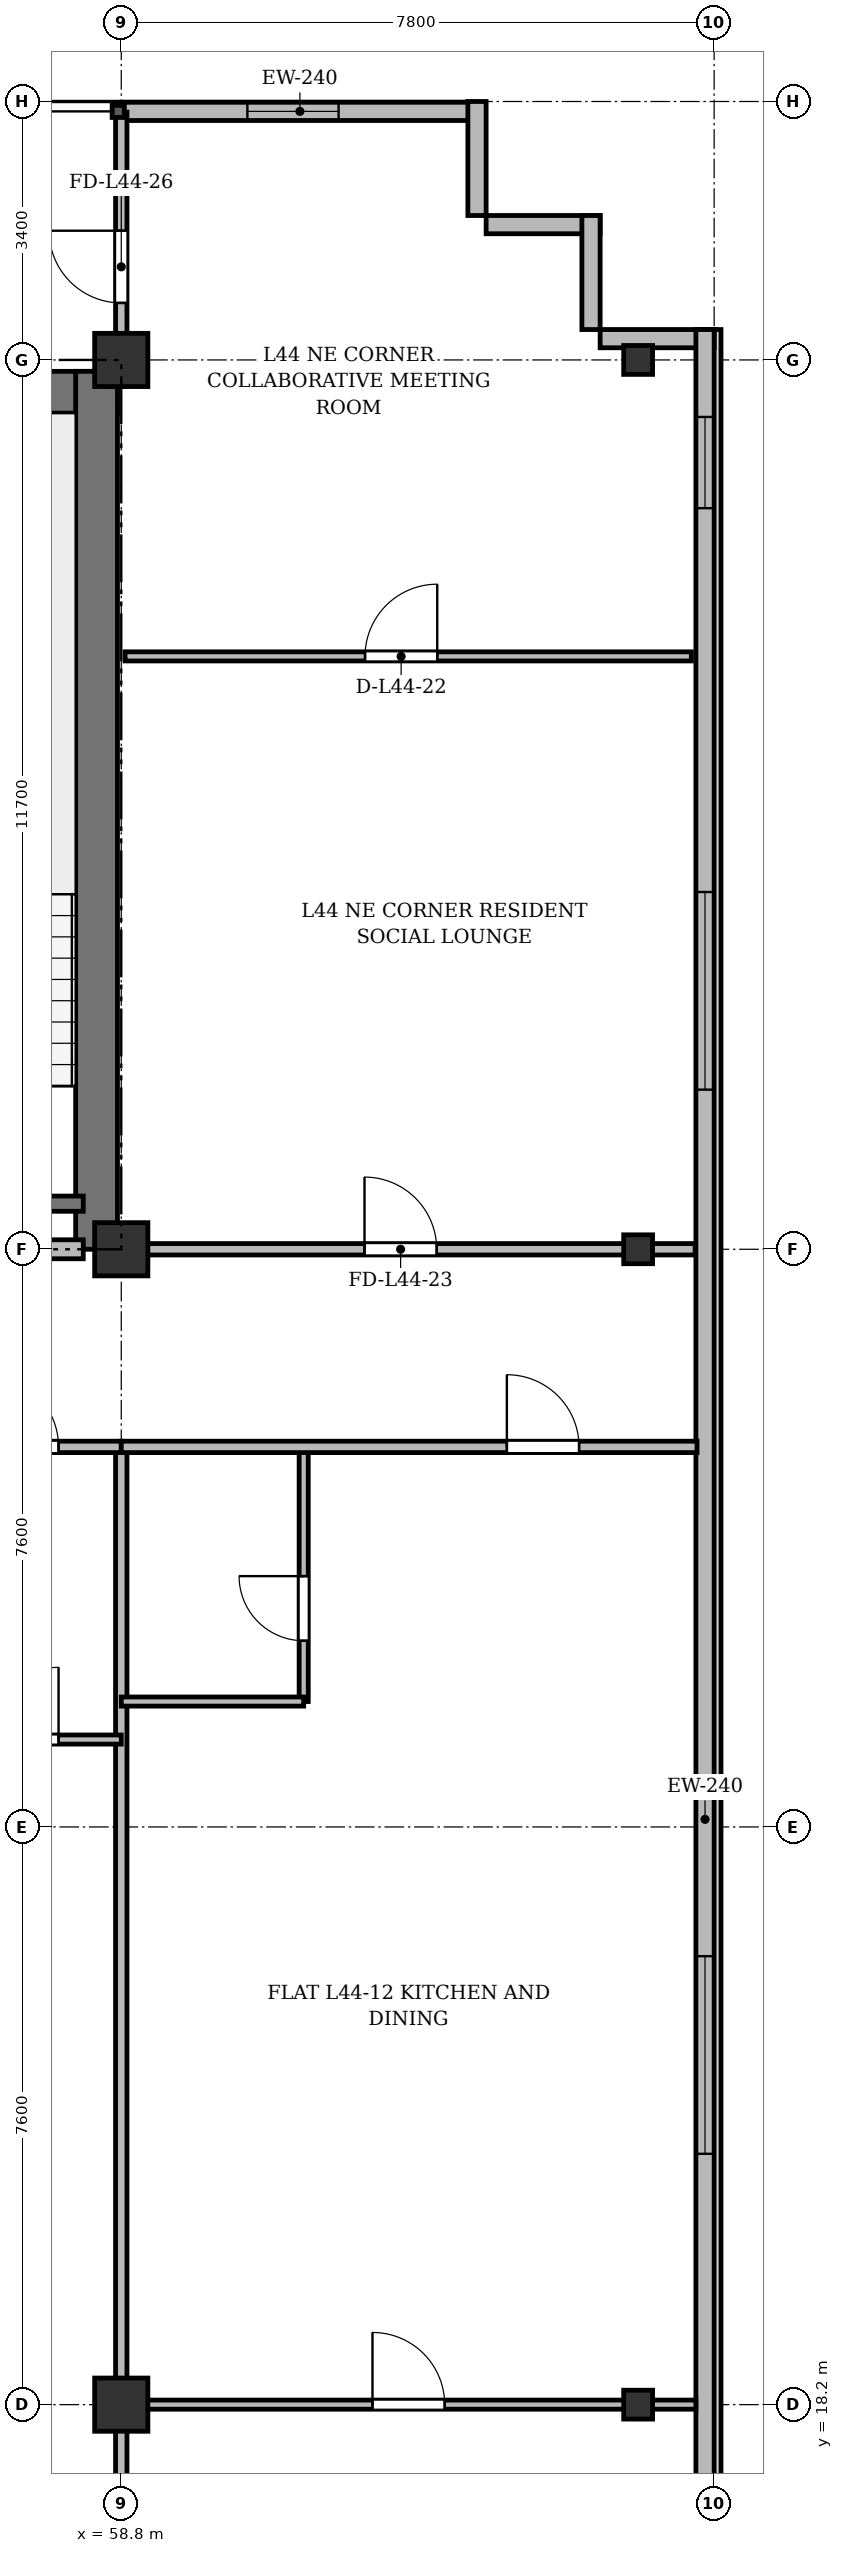
"""IFC4 building model, lengths in metres.
Left out: names, types, materials, properties, quantities, classifications, styles, units other than length and angle.
Written with IfcOpenShell. Run it as: python <this file> out.ifc"""

import sys

from ifc_helpers import new_model, si_unit, direction, frame, frame_2d, origin, origin_2d, place, context, subcontext, project, spatial, rectangle, i_section, extrude, source, transform, mapped, element, fill, save


model = new_model("IFC4")
c1 = context("Model", 3, precision=1e-05, world=origin(), true_north=direction((0.0, 1.0)))
c2 = subcontext(c1, "Body", "Model", "MODEL_VIEW")
j1 = project(units=[si_unit("LENGTHUNIT", "METRE"), si_unit("PLANEANGLEUNIT", "RADIAN")], contexts=[c1])
p1 = place(None, origin())
s1 = spatial("IfcSite", under=j1, at=p1, CompositionType="ELEMENT")
p2 = place(p1, origin())
s2 = spatial("IfcBuilding", under=s1, at=p2, CompositionType="ELEMENT")
p3 = place(p2, frame((0.0, 0.0, 168.1)))
s3 = spatial("IfcBuildingStorey", under=s2, at=p3, CompositionType="ELEMENT", Elevation=168.1)
m1 = source(origin(), c2, "Body", "SweptSolid", [
    extrude(rectangle(XDim=0.7, YDim=0.7, at=origin_2d()), origin(), (0.0, 0.0, 1.0), 3.6),
])
for number, where, z_axis, x_axis in (
    (1, (58.8, 18.2, 0.0), (0.0, 0.0, 1.0), (1.0, 0.0, 0.0)),
    (2, (58.8, 33.4, 0.0), (0.0, 0.0, 1.0), (1.0, 0.0, 0.0)),
    (3, (58.8, 45.1, 0.0), (0.0, 0.0, 1.0), (1.0, 0.0, 0.0)),
):
    element("IfcColumn", number, at=place(p3, frame(where, z_axis=z_axis, x_axis=x_axis)), inside=s3, PredefinedType="COLUMN", context=c2, shape_type="MappedRepresentation", body=[
        mapped(m1, transform((0.0, 0.0, 0.0), x_axis=(1.0, 0.0, 0.0), y_axis=(0.0, 1.0, 0.0), z_axis=(0.0, 0.0, 1.0), scale=1.0)),
    ])
m2 = source(origin(), c2, "Body", "SweptSolid", [
    extrude(i_section(OverallWidth=0.38, OverallDepth=0.38, WebThickness=0.02, FlangeThickness=0.03, at=origin_2d()), origin(), (0.0, 0.0, 1.0), 3.6),
])
for number, where, z_axis, x_axis in (
    (4, (65.6, 18.2, 0.0), (0.0, 0.0, 1.0), (1.0, 0.0, 0.0)),
    (5, (65.6, 33.4, 0.0), (0.0, 0.0, 1.0), (1.0, 0.0, 0.0)),
    (6, (65.6, 45.1, 0.0), (0.0, 0.0, 1.0), (1.0, 0.0, 0.0)),
):
    element("IfcColumn", number, at=place(p3, frame(where, z_axis=z_axis, x_axis=x_axis)), inside=s3, PredefinedType="COLUMN", context=c2, shape_type="MappedRepresentation", body=[
        mapped(m2, transform((0.0, 0.0, 0.0), x_axis=(1.0, 0.0, 0.0), y_axis=(0.0, 1.0, 0.0), z_axis=(0.0, 0.0, 1.0), scale=1.0)),
    ])
p4 = place(p3, frame((58.8, 48.37, 0.0), z_axis=(0.0, 0.0, 1.0), x_axis=(1.0, 0.0, 0.0)))
e7 = element("IfcWall", 7, at=p4, inside=s3, PredefinedType="SOLIDWALL", context=c2, shape_type="SweptSolid", body=[
    extrude(rectangle(XDim=4.7, YDim=0.24, at=frame_2d((2.35, 0.0))), origin(), (0.0, 0.0, 1.0), 3.35),
])
p5 = place(p4, frame((1.659, 0.0, 0.9)))
e8 = element("IfcOpeningElement", 8, at=p5, cuts=e7, PredefinedType="OPENING", context=c2, shape_type="SweptSolid", body=[
    extrude(rectangle(XDim=1.2, YDim=1.65, at=frame_2d((0.6, 0.825))), frame((0.0, 0.13, 0.0), z_axis=(0.0, -1.0, 0.0), x_axis=(1.0, 0.0, 0.0)), (0.0, 0.0, 1.0), 0.26),
])
for number, where, z_axis, x_axis in (
    (9, (63.48, 48.5, 0.0), (0.0, 0.0, 1.0), (0.0, -1.0, 0.0)),
    (10, (63.6, 46.88, 0.0), (0.0, 0.0, 1.0), (1.0, 0.0, 0.0)),
    (11, (64.98, 47.0, 0.0), (0.0, 0.0, 1.0), (0.0, -1.0, 0.0)),
    (12, (65.1, 45.38, 0.0), (0.0, 0.0, 1.0), (1.0, 0.0, 0.0)),
):
    element("IfcWall", number, at=place(p3, frame(where, z_axis=z_axis, x_axis=x_axis)), inside=s3, PredefinedType="SOLIDWALL", context=c2, shape_type="SweptSolid", body=[
        extrude(rectangle(XDim=1.5, YDim=0.24, at=frame_2d((0.75, 0.0))), origin(), (0.0, 0.0, 1.0), 3.35),
    ])
p6 = place(p3, frame((66.48, 45.5, 0.0), z_axis=(0.0, 0.0, 1.0), x_axis=(0.0, -1.0, 0.0)))
e13 = element("IfcWall", 13, at=p6, inside=s3, PredefinedType="SOLIDWALL", context=c2, shape_type="SweptSolid", body=[
    extrude(rectangle(XDim=39.2, YDim=0.24, at=frame_2d((19.6, 0.0))), origin(), (0.0, 0.0, 1.0), 3.35),
])
p7 = place(p6, frame((36.55, 0.0, 0.92)))
e14 = element("IfcOpeningElement", 14, at=p7, cuts=e13, PredefinedType="OPENING", context=c2, shape_type="SweptSolid", body=[
    extrude(rectangle(XDim=1.2, YDim=1.65, at=frame_2d((0.6, 0.825))), frame((0.0, 0.13, 0.0), z_axis=(0.0, -1.0, 0.0), x_axis=(1.0, 0.0, 0.0)), (0.0, 0.0, 1.0), 0.26),
])
p8 = place(p6, frame((32.8, 0.0, 0.92)))
e15 = element("IfcOpeningElement", 15, at=p8, cuts=e13, PredefinedType="OPENING", context=c2, shape_type="SweptSolid", body=[
    extrude(rectangle(XDim=2.6, YDim=1.9, at=frame_2d((1.3, 0.95))), frame((0.0, 0.13, 0.0), z_axis=(0.0, -1.0, 0.0), x_axis=(1.0, 0.0, 0.0)), (0.0, 0.0, 1.0), 0.26),
])
p9 = place(p6, frame((28.6, 0.0, 0.92)))
e16 = element("IfcOpeningElement", 16, at=p9, cuts=e13, PredefinedType="OPENING", context=c2, shape_type="SweptSolid", body=[
    extrude(rectangle(XDim=2.6, YDim=1.9, at=frame_2d((1.3, 0.95))), frame((0.0, 0.13, 0.0), z_axis=(0.0, -1.0, 0.0), x_axis=(1.0, 0.0, 0.0)), (0.0, 0.0, 1.0), 0.26),
])
p10 = place(p6, frame((21.4, 0.0, 0.92)))
e17 = element("IfcOpeningElement", 17, at=p10, cuts=e13, PredefinedType="OPENING", context=c2, shape_type="SweptSolid", body=[
    extrude(rectangle(XDim=2.6, YDim=1.9, at=frame_2d((1.3, 0.95))), frame((0.0, 0.13, 0.0), z_axis=(0.0, -1.0, 0.0), x_axis=(1.0, 0.0, 0.0)), (0.0, 0.0, 1.0), 0.26),
])
p11 = place(p6, frame((7.4, 0.0, 0.92)))
e18 = element("IfcOpeningElement", 18, at=p11, cuts=e13, PredefinedType="OPENING", context=c2, shape_type="SweptSolid", body=[
    extrude(rectangle(XDim=2.6, YDim=1.9, at=frame_2d((1.3, 0.95))), frame((0.0, 0.13, 0.0), z_axis=(0.0, -1.0, 0.0), x_axis=(1.0, 0.0, 0.0)), (0.0, 0.0, 1.0), 0.26),
])
p12 = place(p6, frame((1.15, 0.0, 0.92)))
e19 = element("IfcOpeningElement", 19, at=p12, cuts=e13, PredefinedType="OPENING", context=c2, shape_type="SweptSolid", body=[
    extrude(rectangle(XDim=1.2, YDim=1.65, at=frame_2d((0.6, 0.825))), frame((0.0, 0.13, 0.0), z_axis=(0.0, -1.0, 0.0), x_axis=(1.0, 0.0, 0.0)), (0.0, 0.0, 1.0), 0.26),
])
p13 = place(p3, frame((15.65, 44.675, 0.0), z_axis=(0.0, 0.0, 1.0), x_axis=(1.0, 0.0, 0.0)))
e20 = element("IfcWall", 20, at=p13, inside=s3, PredefinedType="SHEAR", context=c2, shape_type="SweptSolid", body=[
    extrude(rectangle(XDim=43.1, YDim=0.55, at=frame_2d((21.55, 0.0))), origin(), (0.0, 0.0, 1.0), 3.35),
])
p14 = place(p3, frame((58.475, 33.4, 0.0), z_axis=(0.0, 0.0, 1.0), x_axis=(0.0, 1.0, 0.0)))
e21 = element("IfcWall", 21, at=p14, inside=s3, PredefinedType="SHEAR", context=c2, shape_type="SweptSolid", body=[
    extrude(rectangle(XDim=11.55, YDim=0.55, at=frame_2d((5.775, 0.0))), origin(), (0.0, 0.0, 1.0), 3.35),
])
p15 = place(p3, frame((54.9, 34.0, 0.0), z_axis=(0.0, 0.0, 1.0), x_axis=(1.0, 0.0, 0.0)))
e22 = element("IfcWall", 22, at=p15, inside=s3, PredefinedType="SHEAR", context=c2, shape_type="SweptSolid", body=[
    extrude(rectangle(XDim=3.4, YDim=0.2, at=frame_2d((1.7, 0.0))), origin(), (0.0, 0.0, 1.0), 3.35),
])
p16 = place(p3, frame((47.15, 33.4, 0.0), z_axis=(0.0, 0.0, 1.0), x_axis=(1.0, 0.0, 0.0)))
e23 = element("IfcWall", 23, at=p16, inside=s3, PredefinedType="PARTITIONING", context=c2, shape_type="SweptSolid", body=[
    extrude(rectangle(XDim=11.15, YDim=0.25, at=frame_2d((5.575, 0.0))), origin(), (0.0, 0.0, 1.0), 2.75),
])
p17 = place(p16, frame((0.7, 0.0, 0.0)))
e24 = element("IfcOpeningElement", 24, at=p17, cuts=e23, PredefinedType="OPENING", context=c2, shape_type="SweptSolid", body=[
    extrude(rectangle(XDim=0.95, YDim=2.15, at=frame_2d((0.475, 1.075))), frame((0.0, 0.135, 0.0), z_axis=(0.0, -1.0, 0.0), x_axis=(1.0, 0.0, 0.0)), (0.0, 0.0, 1.0), 0.27),
])
p18 = place(p16, frame((6.0, 0.0, 0.0)))
e25 = element("IfcOpeningElement", 25, at=p18, cuts=e23, PredefinedType="OPENING", context=c2, shape_type="SweptSolid", body=[
    extrude(rectangle(XDim=1.2, YDim=2.15, at=frame_2d((0.6, 1.075))), frame((0.0, 0.135, 0.0), z_axis=(0.0, -1.0, 0.0), x_axis=(1.0, 0.0, 0.0)), (0.0, 0.0, 1.0), 0.27),
])
p19 = place(p3, frame((58.85, 41.2, 0.0), z_axis=(0.0, 0.0, 1.0), x_axis=(1.0, 0.0, 0.0)))
e26 = element("IfcWall", 26, at=p19, inside=s3, PredefinedType="PARTITIONING", context=c2, shape_type="SweptSolid", body=[
    extrude(rectangle(XDim=7.45, YDim=0.12, at=frame_2d((3.725, 0.0))), origin(), (0.0, 0.0, 1.0), 2.85),
])
p20 = place(p19, frame((3.157, 0.0, 0.0)))
e27 = element("IfcOpeningElement", 27, at=p20, cuts=e26, PredefinedType="OPENING", context=c2, shape_type="SweptSolid", body=[
    extrude(rectangle(XDim=0.95, YDim=2.15, at=frame_2d((0.475, 1.075))), frame((0.0, 0.07, 0.0), z_axis=(0.0, -1.0, 0.0), x_axis=(1.0, 0.0, 0.0)), (0.0, 0.0, 1.0), 0.14),
])
p21 = place(p3, frame((58.8, 33.4, 0.0), z_axis=(0.0, 0.0, 1.0), x_axis=(1.0, 0.0, 0.0)))
e28 = element("IfcWall", 28, at=p21, inside=s3, PredefinedType="PARTITIONING", context=c2, shape_type="SweptSolid", body=[
    extrude(rectangle(XDim=7.55, YDim=0.15, at=frame_2d((3.775, 0.0))), origin(), (0.0, 0.0, 1.0), 2.75),
])
p22 = place(p21, frame((3.2, 0.0, 0.0)))
e29 = element("IfcOpeningElement", 29, at=p22, cuts=e28, PredefinedType="OPENING", context=c2, shape_type="SweptSolid", body=[
    extrude(rectangle(XDim=0.95, YDim=2.15, at=frame_2d((0.475, 1.075))), frame((0.0, 0.085, 0.0), z_axis=(0.0, -1.0, 0.0), x_axis=(1.0, 0.0, 0.0)), (0.0, 0.0, 1.0), 0.17),
])
p23 = place(p3, frame((58.8, 44.75, 0.0), z_axis=(0.0, 0.0, 1.0), x_axis=(0.0, 1.0, 0.0)))
e30 = element("IfcWall", 30, at=p23, inside=s3, PredefinedType="PARTITIONING", context=c2, shape_type="SweptSolid", body=[
    extrude(rectangle(XDim=3.61, YDim=0.15, at=frame_2d((1.805, 0.0))), origin(), (0.0, 0.0, 1.0), 2.85),
])
p24 = place(p23, frame((1.1, 0.0, 0.0)))
e31 = element("IfcOpeningElement", 31, at=p24, cuts=e30, PredefinedType="OPENING", context=c2, shape_type="SweptSolid", body=[
    extrude(rectangle(XDim=0.95, YDim=2.15, at=frame_2d((0.475, 1.075))), frame((0.0, 0.085, 0.0), z_axis=(0.0, -1.0, 0.0), x_axis=(1.0, 0.0, 0.0)), (0.0, 0.0, 1.0), 0.17),
])
p25 = place(p3, frame((58.8, 3.525, 0.0), z_axis=(0.0, 0.0, 1.0), x_axis=(0.0, 1.0, 0.0)))
e32 = element("IfcWall", 32, at=p25, inside=s3, PredefinedType="PARTITIONING", context=c2, shape_type="SweptSolid", body=[
    extrude(rectangle(XDim=27.275, YDim=0.15, at=frame_2d((13.638, 0.0))), origin(), (0.0, 0.0, 1.0), 2.85),
])
p26 = place(p3, frame((56.2, 30.8, 0.0), z_axis=(0.0, 0.0, 1.0), x_axis=(1.0, 0.0, 0.0)))
e33 = element("IfcWall", 33, at=p26, inside=s3, PredefinedType="PARTITIONING", context=c2, shape_type="SweptSolid", body=[
    extrude(rectangle(XDim=2.6, YDim=0.15, at=frame_2d((1.3, 0.0))), origin(), (0.0, 0.0, 1.0), 2.85),
])
p27 = place(p26, frame((0.825, 0.0, 0.0)))
e34 = element("IfcOpeningElement", 34, at=p27, cuts=e33, PredefinedType="OPENING", context=c2, shape_type="SweptSolid", body=[
    extrude(rectangle(XDim=0.95, YDim=2.15, at=frame_2d((0.475, 1.075))), frame((0.0, 0.085, 0.0), z_axis=(0.0, -1.0, 0.0), x_axis=(1.0, 0.0, 0.0)), (0.0, 0.0, 1.0), 0.17),
])
p28 = place(p3, frame((56.2, 26.95, 0.0), z_axis=(0.0, 0.0, 1.0), x_axis=(1.0, 0.0, 0.0)))
e35 = element("IfcWall", 35, at=p28, inside=s3, PredefinedType="PARTITIONING", context=c2, shape_type="SweptSolid", body=[
    extrude(rectangle(XDim=2.6, YDim=0.12, at=frame_2d((1.3, 0.0))), origin(), (0.0, 0.0, 1.0), 2.85),
])
p29 = place(p28, frame((0.825, 0.0, 0.0)))
e36 = element("IfcOpeningElement", 36, at=p29, cuts=e35, PredefinedType="OPENING", context=c2, shape_type="SweptSolid", body=[
    extrude(rectangle(XDim=0.95, YDim=2.15, at=frame_2d((0.475, 1.075))), frame((0.0, 0.07, 0.0), z_axis=(0.0, -1.0, 0.0), x_axis=(1.0, 0.0, 0.0)), (0.0, 0.0, 1.0), 0.14),
])
p30 = place(p3, frame((58.8, 18.2, 0.0), z_axis=(0.0, 0.0, 1.0), x_axis=(1.0, 0.0, 0.0)))
e37 = element("IfcWall", 37, at=p30, inside=s3, PredefinedType="PARTITIONING", context=c2, shape_type="SweptSolid", body=[
    extrude(rectangle(XDim=7.56, YDim=0.12, at=frame_2d((3.78, 0.0))), origin(), (0.0, 0.0, 1.0), 2.75),
])
p31 = place(p30, frame((3.305, 0.0, 0.0)))
e38 = element("IfcOpeningElement", 38, at=p31, cuts=e37, PredefinedType="OPENING", context=c2, shape_type="SweptSolid", body=[
    extrude(rectangle(XDim=0.95, YDim=2.15, at=frame_2d((0.475, 1.075))), frame((0.0, 0.07, 0.0), z_axis=(0.0, -1.0, 0.0), x_axis=(1.0, 0.0, 0.0)), (0.0, 0.0, 1.0), 0.14),
])
p32 = place(p3, frame((61.2, 27.45, 0.0), z_axis=(0.0, 0.0, 1.0), x_axis=(0.0, 1.0, 0.0)))
e39 = element("IfcWall", 39, at=p32, inside=s3, PredefinedType="PARTITIONING", context=c2, shape_type="SweptSolid", body=[
    extrude(rectangle(XDim=3.35, YDim=0.12, at=frame_2d((1.675, 0.0))), origin(), (0.0, 0.0, 1.0), 3.35),
])
p33 = place(p32, frame((0.8, 0.0, 0.0)))
e40 = element("IfcOpeningElement", 40, at=p33, cuts=e39, PredefinedType="OPENING", context=c2, shape_type="SweptSolid", body=[
    extrude(rectangle(XDim=0.85, YDim=2.1, at=frame_2d((0.425, 1.05))), frame((0.0, 0.07, 0.0), z_axis=(0.0, -1.0, 0.0), x_axis=(1.0, 0.0, 0.0)), (0.0, 0.0, 1.0), 0.14),
])
p34 = place(p3, frame((58.8, 27.45, 0.0), z_axis=(0.0, 0.0, 1.0), x_axis=(1.0, 0.0, 0.0)))
e41 = element("IfcWall", 41, at=p34, inside=s3, PredefinedType="PARTITIONING", context=c2, shape_type="SweptSolid", body=[
    extrude(rectangle(XDim=2.4, YDim=0.12, at=frame_2d((1.2, 0.0))), origin(), (0.0, 0.0, 1.0), 2.85),
])
p35 = place(p3, frame((58.8, 30.8, 0.0), z_axis=(0.0, 0.0, 1.0), x_axis=(1.0, 0.0, 0.0)))
e42 = element("IfcWall", 42, at=p35, inside=s3, PredefinedType="PARTITIONING", context=c2, shape_type="SweptSolid", body=[
    extrude(rectangle(XDim=7.575, YDim=0.15, at=frame_2d((3.788, 0.0))), origin(), (0.0, 0.0, 1.0), 2.85),
])
p36 = place(p35, frame((5.073, 0.0, 0.0)))
e43 = element("IfcOpeningElement", 43, at=p36, cuts=e42, PredefinedType="OPENING", context=c2, shape_type="SweptSolid", body=[
    extrude(rectangle(XDim=0.95, YDim=2.15, at=frame_2d((0.475, 1.075))), frame((0.0, 0.085, 0.0), z_axis=(0.0, -1.0, 0.0), x_axis=(1.0, 0.0, 0.0)), (0.0, 0.0, 1.0), 0.17),
])
m3 = source(origin(), c2, "Body", "SweptSolid", [
    extrude(rectangle(XDim=1.2, YDim=1.65, at=frame_2d((0.6, 0.825))), frame((0.0, 0.03, 0.0), z_axis=(0.0, -1.0, 0.0), x_axis=(1.0, 0.0, 0.0)), (0.0, 0.0, 1.0), 0.06),
])
p37 = place(p5, origin())
e44 = element("IfcWindow", 44, at=p37, inside=s3, PartitioningType="SINGLE_PANEL", PredefinedType="WINDOW", context=c2, shape_type="MappedRepresentation", body=[
    mapped(m3, transform((0.0, 0.0, 0.0), x_axis=(1.0, 0.0, 0.0), y_axis=(0.0, 1.0, 0.0), z_axis=(0.0, 0.0, 1.0), scale=1.0)),
])
fill(e8, e44)
m4 = source(origin(), c2, "Body", "SweptSolid", [
    extrude(rectangle(XDim=2.6, YDim=1.9, at=frame_2d((1.3, 0.95))), frame((0.0, 0.03, 0.0), z_axis=(0.0, -1.0, 0.0), x_axis=(1.0, 0.0, 0.0)), (0.0, 0.0, 1.0), 0.06),
])
p38 = place(p10, origin())
e45 = element("IfcWindow", 45, at=p38, inside=s3, PartitioningType="SINGLE_PANEL", PredefinedType="WINDOW", context=c2, shape_type="MappedRepresentation", body=[
    mapped(m4, transform((0.0, 0.0, 0.0), x_axis=(1.0, 0.0, 0.0), y_axis=(0.0, 1.0, 0.0), z_axis=(0.0, 0.0, 1.0), scale=1.0)),
])
fill(e17, e45)
p39 = place(p11, origin())
e46 = element("IfcWindow", 46, at=p39, inside=s3, PartitioningType="SINGLE_PANEL", PredefinedType="WINDOW", context=c2, shape_type="MappedRepresentation", body=[
    mapped(m4, transform((0.0, 0.0, 0.0), x_axis=(1.0, 0.0, 0.0), y_axis=(0.0, 1.0, 0.0), z_axis=(0.0, 0.0, 1.0), scale=1.0)),
])
fill(e18, e46)
p40 = place(p12, origin())
e47 = element("IfcWindow", 47, at=p40, inside=s3, PartitioningType="SINGLE_PANEL", PredefinedType="WINDOW", context=c2, shape_type="MappedRepresentation", body=[
    mapped(m3, transform((0.0, 0.0, 0.0), x_axis=(1.0, 0.0, 0.0), y_axis=(0.0, 1.0, 0.0), z_axis=(0.0, 0.0, 1.0), scale=1.0)),
])
fill(e19, e47)
m5 = source(origin(), c2, "Body", "SweptSolid", [
    extrude(rectangle(XDim=0.95, YDim=2.15, at=frame_2d((0.475, 1.075))), frame((0.0, 0.025, 0.0), z_axis=(0.0, -1.0, 0.0), x_axis=(1.0, 0.0, 0.0)), (0.0, 0.0, 1.0), 0.05),
])
p41 = place(p20, origin())
e48 = element("IfcDoor", 48, at=p41, inside=s3, OperationType="SINGLE_SWING_RIGHT", PredefinedType="DOOR", context=c2, shape_type="MappedRepresentation", body=[
    mapped(m5, transform((0.0, 0.0, 0.0), x_axis=(1.0, 0.0, 0.0), y_axis=(0.0, 1.0, 0.0), z_axis=(0.0, 0.0, 1.0), scale=1.0)),
])
fill(e27, e48)
p42 = place(p22, origin())
e49 = element("IfcDoor", 49, at=p42, inside=s3, OperationType="SINGLE_SWING_LEFT", PredefinedType="DOOR", context=c2, shape_type="MappedRepresentation", body=[
    mapped(m5, transform((0.0, 0.0, 0.0), x_axis=(1.0, 0.0, 0.0), y_axis=(0.0, 1.0, 0.0), z_axis=(0.0, 0.0, 1.0), scale=1.0)),
])
fill(e29, e49)
p43 = place(p24, origin())
e50 = element("IfcDoor", 50, at=p43, inside=s3, OperationType="SINGLE_SWING_RIGHT", PredefinedType="DOOR", context=c2, shape_type="MappedRepresentation", body=[
    mapped(m5, transform((0.0, 0.0, 0.0), x_axis=(1.0, 0.0, 0.0), y_axis=(0.0, 1.0, 0.0), z_axis=(0.0, 0.0, 1.0), scale=1.0)),
])
fill(e31, e50)
p44 = place(p27, origin())
e51 = element("IfcDoor", 51, at=p44, inside=s3, OperationType="SINGLE_SWING_LEFT", PredefinedType="DOOR", context=c2, shape_type="MappedRepresentation", body=[
    mapped(m5, transform((0.0, 0.0, 0.0), x_axis=(1.0, 0.0, 0.0), y_axis=(0.0, 1.0, 0.0), z_axis=(0.0, 0.0, 1.0), scale=1.0)),
])
fill(e34, e51)
p45 = place(p29, origin())
e52 = element("IfcDoor", 52, at=p45, inside=s3, OperationType="SINGLE_SWING_RIGHT", PredefinedType="DOOR", context=c2, shape_type="MappedRepresentation", body=[
    mapped(m5, transform((0.0, 0.0, 0.0), x_axis=(1.0, 0.0, 0.0), y_axis=(0.0, 1.0, 0.0), z_axis=(0.0, 0.0, 1.0), scale=1.0)),
])
fill(e36, e52)
p46 = place(p31, origin())
e53 = element("IfcDoor", 53, at=p46, inside=s3, OperationType="SINGLE_SWING_LEFT", PredefinedType="DOOR", context=c2, shape_type="MappedRepresentation", body=[
    mapped(m5, transform((0.0, 0.0, 0.0), x_axis=(1.0, 0.0, 0.0), y_axis=(0.0, 1.0, 0.0), z_axis=(0.0, 0.0, 1.0), scale=1.0)),
])
fill(e38, e53)
m6 = source(origin(), c2, "Body", "SweptSolid", [
    extrude(rectangle(XDim=0.85, YDim=2.1, at=frame_2d((0.425, 1.05))), frame((0.0, 0.025, 0.0), z_axis=(0.0, -1.0, 0.0), x_axis=(1.0, 0.0, 0.0)), (0.0, 0.0, 1.0), 0.05),
])
p47 = place(p33, origin())
e54 = element("IfcDoor", 54, at=p47, inside=s3, OperationType="SINGLE_SWING_RIGHT", PredefinedType="DOOR", context=c2, shape_type="MappedRepresentation", body=[
    mapped(m6, transform((0.0, 0.0, 0.0), x_axis=(1.0, 0.0, 0.0), y_axis=(0.0, 1.0, 0.0), z_axis=(0.0, 0.0, 1.0), scale=1.0)),
])
fill(e40, e54)
p48 = place(p36, origin())
e55 = element("IfcDoor", 55, at=p48, inside=s3, OperationType="SINGLE_SWING_LEFT", PredefinedType="DOOR", context=c2, shape_type="MappedRepresentation", body=[
    mapped(m5, transform((0.0, 0.0, 0.0), x_axis=(1.0, 0.0, 0.0), y_axis=(0.0, 1.0, 0.0), z_axis=(0.0, 0.0, 1.0), scale=1.0)),
])
fill(e43, e55)
save(model, sys.argv[1])
